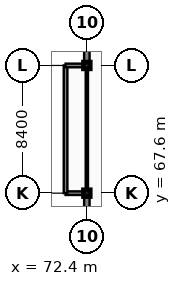
"""IFC4 building model, lengths in metres.
Left out: names, types, materials, properties, quantities, classifications, styles, units other than length and angle.
Written with IfcOpenShell. Run it as: python <this file> out.ifc"""

import sys

from ifc_helpers import new_model, si_unit, direction, frame, frame_2d, origin, origin_2d, place, context, subcontext, project, spatial, rectangle, extrude, element, fill, save


model = new_model("IFC4")
c1 = context("Model", 3, precision=1e-05, world=origin(), true_north=direction((0.0, 1.0)))
c2 = subcontext(c1, "Body", "Model", "MODEL_VIEW")
j1 = project(units=[si_unit("LENGTHUNIT", "METRE"), si_unit("PLANEANGLEUNIT", "RADIAN")], contexts=[c1])
p1 = place(None, origin())
s1 = spatial("IfcSite", under=j1, at=p1, CompositionType="ELEMENT")
p2 = place(p1, origin())
s2 = spatial("IfcBuilding", under=s1, at=p2, CompositionType="ELEMENT")
p3 = place(p2, frame((0.0, 0.0, 9.6)))
s3 = spatial("IfcBuildingStorey", under=s2, at=p3, CompositionType="ELEMENT", Elevation=9.6)
for number, where, z_axis, x_axis in (
    (1, (72.4, 67.6, 0.0), (0.0, 0.0, 1.0), (1.0, 0.0, 0.0)),
    (2, (72.4, 76.0, 0.0), (0.0, 0.0, 1.0), (1.0, 0.0, 0.0)),
):
    element("IfcColumn", number, at=place(p3, frame(where, z_axis=z_axis, x_axis=x_axis)), inside=s3, PredefinedType="COLUMN", context=c2, shape_type="SweptSolid", body=[
        extrude(rectangle(XDim=0.44, YDim=0.44, at=origin_2d()), origin(), (0.0, 0.0, 1.0), 4.2),
    ])
p4 = place(p3, frame((72.4, 67.6, 0.0), z_axis=(0.0, 0.0, 1.0), x_axis=(0.0, 1.0, 0.0)))
e3 = element("IfcWall", 3, at=p4, inside=s3, PredefinedType="PARTITIONING", context=c2, shape_type="SweptSolid", body=[
    extrude(rectangle(XDim=8.4, YDim=0.15, at=frame_2d((4.2, 0.0))), origin(), (0.0, 0.0, 1.0), 3.27),
])
p5 = place(p4, frame((3.7, 0.0, -0.01)))
e4 = element("IfcOpeningElement", 4, at=p5, cuts=e3, PredefinedType="OPENING", context=c2, shape_type="SweptSolid", body=[
    extrude(rectangle(XDim=1.0, YDim=2.16, at=frame_2d((0.5, 1.08))), frame((0.0, 0.085, 0.0), z_axis=(0.0, -1.0, 0.0), x_axis=(1.0, 0.0, 0.0)), (0.0, 0.0, 1.0), 0.17),
])
p6 = place(p3, frame((72.4, 67.6, 0.0), z_axis=(0.0, 0.0, 1.0), x_axis=(0.0, -1.0, 0.0)))
e5 = element("IfcWall", 5, at=p6, inside=s3, PredefinedType="SOLIDWALL", context=c2, shape_type="SweptSolid", body=[
    extrude(rectangle(XDim=8.4, YDim=0.36, at=frame_2d((4.2, 0.0))), origin(), (0.0, 0.0, 1.0), 3.27),
])
p7 = place(p6, frame((0.46, 0.0, 0.75)))
e6 = element("IfcOpeningElement", 6, at=p7, cuts=e5, PredefinedType="OPENING", context=c2, shape_type="SweptSolid", body=[
    extrude(rectangle(XDim=1.55, YDim=2.38, at=frame_2d((0.775, 1.19))), frame((0.0, 0.19, 0.0), z_axis=(0.0, -1.0, 0.0), x_axis=(1.0, 0.0, 0.0)), (0.0, 0.0, 1.0), 0.38),
])
p8 = place(p6, frame((6.26, 0.0, 0.75)))
e7 = element("IfcOpeningElement", 7, at=p8, cuts=e5, PredefinedType="OPENING", context=c2, shape_type="SweptSolid", body=[
    extrude(rectangle(XDim=1.55, YDim=2.38, at=frame_2d((0.775, 1.19))), frame((0.0, 0.19, 0.0), z_axis=(0.0, -1.0, 0.0), x_axis=(1.0, 0.0, 0.0)), (0.0, 0.0, 1.0), 0.38),
])
p9 = place(p3, frame((72.4, 80.8, 0.0), z_axis=(0.0, 0.0, 1.0), x_axis=(0.0, -1.0, 0.0)))
e8 = element("IfcWall", 8, at=p9, inside=s3, PredefinedType="SOLIDWALL", context=c2, shape_type="SweptSolid", body=[
    extrude(rectangle(XDim=4.8, YDim=0.36, at=frame_2d((2.4, 0.0))), origin(), (0.0, 0.0, 1.0), 3.27),
])
p10 = place(p9, frame((0.46, 0.0, 0.75)))
e9 = element("IfcOpeningElement", 9, at=p10, cuts=e8, PredefinedType="OPENING", context=c2, shape_type="SweptSolid", body=[
    extrude(rectangle(XDim=1.55, YDim=2.38, at=frame_2d((0.775, 1.19))), frame((0.0, 0.19, 0.0), z_axis=(0.0, -1.0, 0.0), x_axis=(1.0, 0.0, 0.0)), (0.0, 0.0, 1.0), 0.38),
])
p11 = place(p9, frame((2.66, 0.0, 0.75)))
e10 = element("IfcOpeningElement", 10, at=p11, cuts=e8, PredefinedType="OPENING", context=c2, shape_type="SweptSolid", body=[
    extrude(rectangle(XDim=1.55, YDim=2.38, at=frame_2d((0.775, 1.19))), frame((0.0, 0.19, 0.0), z_axis=(0.0, -1.0, 0.0), x_axis=(1.0, 0.0, 0.0)), (0.0, 0.0, 1.0), 0.38),
])
p12 = place(p3, frame((72.25, 67.6, 0.0), z_axis=(0.0, 0.0, 1.0), x_axis=(-1.0, 0.0, 0.0)))
e11 = element("IfcWall", 11, at=p12, inside=s3, PredefinedType="SOLIDWALL", context=c2, shape_type="SweptSolid", body=[
    extrude(rectangle(XDim=1.25, YDim=0.24, at=frame_2d((0.625, 0.0))), origin(), (0.0, 0.0, 1.0), 3.27),
])
p13 = place(p3, frame((71.0, 67.6, 0.0), z_axis=(0.0, 0.0, 1.0), x_axis=(0.0, 1.0, 0.0)))
e12 = element("IfcWall", 12, at=p13, inside=s3, PredefinedType="SOLIDWALL", context=c2, shape_type="SweptSolid", body=[
    extrude(rectangle(XDim=8.4, YDim=0.24, at=frame_2d((4.2, 0.0))), origin(), (0.0, 0.0, 1.0), 3.27),
])
p14 = place(p13, frame((0.46, 0.0, 0.65)))
e13 = element("IfcOpeningElement", 13, at=p14, cuts=e12, PredefinedType="OPENING", context=c2, shape_type="SweptSolid", body=[
    extrude(rectangle(XDim=2.4, YDim=2.2, at=frame_2d((1.2, 1.1))), frame((0.0, 0.13, 0.0), z_axis=(0.0, -1.0, 0.0), x_axis=(1.0, 0.0, 0.0)), (0.0, 0.0, 1.0), 0.26),
])
p15 = place(p13, frame((5.46, 0.0, 0.65)))
e14 = element("IfcOpeningElement", 14, at=p15, cuts=e12, PredefinedType="OPENING", context=c2, shape_type="SweptSolid", body=[
    extrude(rectangle(XDim=2.4, YDim=2.2, at=frame_2d((1.2, 1.1))), frame((0.0, 0.13, 0.0), z_axis=(0.0, -1.0, 0.0), x_axis=(1.0, 0.0, 0.0)), (0.0, 0.0, 1.0), 0.26),
])
p16 = place(p3, frame((71.0, 76.0, 0.0), z_axis=(0.0, 0.0, 1.0), x_axis=(1.0, 0.0, 0.0)))
e15 = element("IfcWall", 15, at=p16, inside=s3, PredefinedType="SOLIDWALL", context=c2, shape_type="SweptSolid", body=[
    extrude(rectangle(XDim=1.25, YDim=0.24, at=frame_2d((0.625, 0.0))), origin(), (0.0, 0.0, 1.0), 3.27),
])
p17 = place(p5, frame((0.0, 0.0, 0.01)))
e16 = element("IfcDoor", 16, at=p17, inside=s3, OperationType="SINGLE_SWING_LEFT", PredefinedType="DOOR", context=c2, shape_type="SweptSolid", body=[
    extrude(rectangle(XDim=1.0, YDim=2.15, at=frame_2d((0.5, 1.075))), frame((0.0, 0.025, 0.0), z_axis=(0.0, -1.0, 0.0), x_axis=(1.0, 0.0, 0.0)), (0.0, 0.0, 1.0), 0.05),
])
fill(e4, e16)
p18 = place(p7, origin())
e17 = element("IfcWindow", 17, at=p18, inside=s3, PartitioningType="DOUBLE_PANEL_HORIZONTAL", PredefinedType="WINDOW", context=c2, shape_type="SweptSolid", body=[
    extrude(rectangle(XDim=1.55, YDim=2.38, at=frame_2d((0.775, 1.19))), frame((0.0, 0.03, 0.0), z_axis=(0.0, -1.0, 0.0), x_axis=(1.0, 0.0, 0.0)), (0.0, 0.0, 1.0), 0.06),
])
fill(e6, e17)
p19 = place(p11, origin())
e18 = element("IfcWindow", 18, at=p19, inside=s3, PartitioningType="DOUBLE_PANEL_HORIZONTAL", PredefinedType="WINDOW", context=c2, shape_type="SweptSolid", body=[
    extrude(rectangle(XDim=1.55, YDim=2.38, at=frame_2d((0.775, 1.19))), frame((0.0, 0.03, 0.0), z_axis=(0.0, -1.0, 0.0), x_axis=(1.0, 0.0, 0.0)), (0.0, 0.0, 1.0), 0.06),
])
fill(e10, e18)
p20 = place(p14, origin())
e19 = element("IfcWindow", 19, at=p20, inside=s3, PartitioningType="TRIPLE_PANEL_VERTICAL", PredefinedType="WINDOW", context=c2, shape_type="SweptSolid", body=[
    extrude(rectangle(XDim=2.4, YDim=2.2, at=frame_2d((1.2, 1.1))), frame((0.0, 0.03, 0.0), z_axis=(0.0, -1.0, 0.0), x_axis=(1.0, 0.0, 0.0)), (0.0, 0.0, 1.0), 0.06),
])
fill(e13, e19)
p21 = place(p15, origin())
e20 = element("IfcWindow", 20, at=p21, inside=s3, PartitioningType="TRIPLE_PANEL_VERTICAL", PredefinedType="WINDOW", context=c2, shape_type="SweptSolid", body=[
    extrude(rectangle(XDim=2.4, YDim=2.2, at=frame_2d((1.2, 1.1))), frame((0.0, 0.03, 0.0), z_axis=(0.0, -1.0, 0.0), x_axis=(1.0, 0.0, 0.0)), (0.0, 0.0, 1.0), 0.06),
])
fill(e14, e20)
save(model, sys.argv[1])
